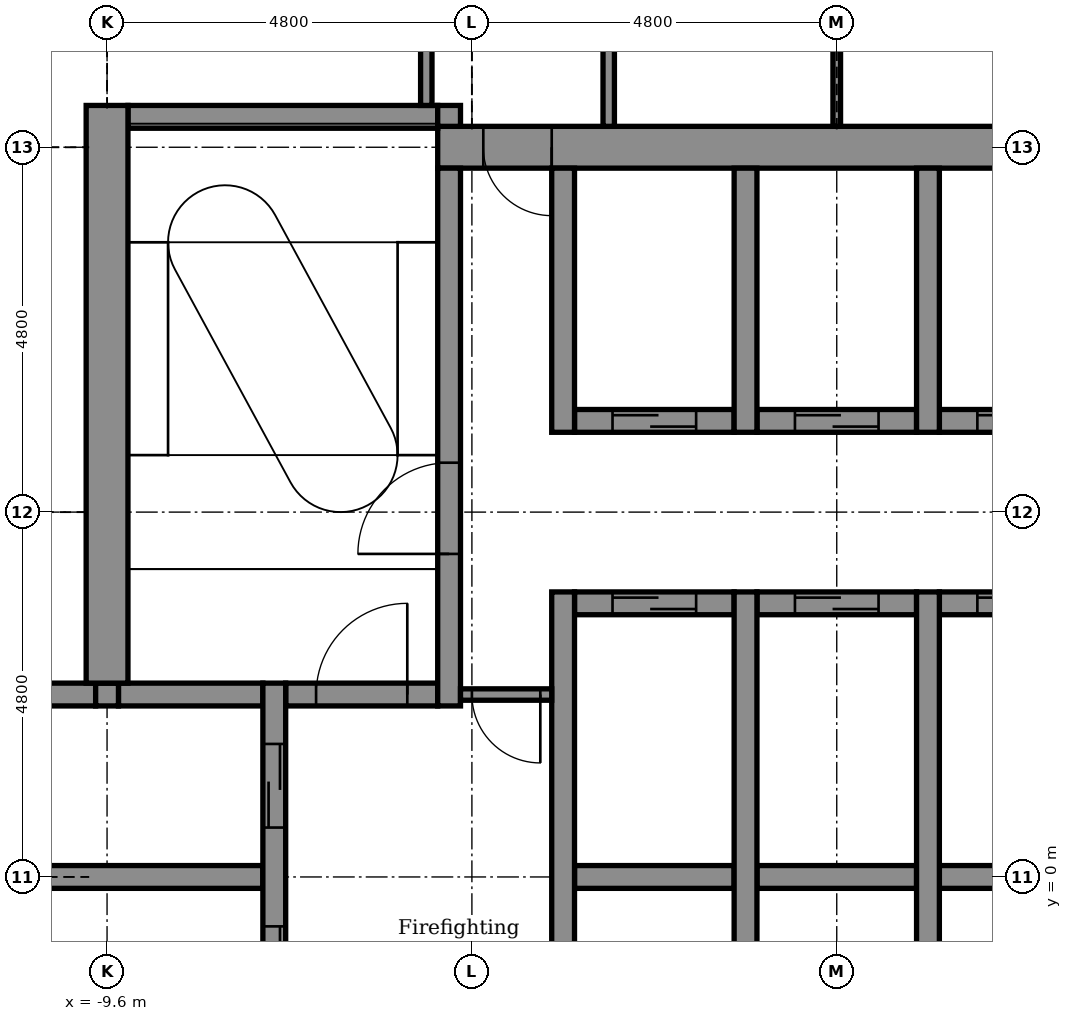
"""IFC4 building model, lengths in metres.
Left out: names, types, materials, properties, quantities, classifications, styles, units other than length and angle.
Written with IfcOpenShell. Run it as: python <this file> out.ifc"""

import sys

from ifc_helpers import new_model, si_unit, direction, frame, frame_2d, origin, place, context, subcontext, project, spatial, rectangle, extrude, element, fill, save


model = new_model("IFC4")
c1 = context("Model", 3, precision=1e-05, world=origin(), true_north=direction((0.0, 1.0)))
c2 = subcontext(c1, "Body", "Model", "MODEL_VIEW")
j1 = project(units=[si_unit("LENGTHUNIT", "METRE"), si_unit("PLANEANGLEUNIT", "RADIAN")], contexts=[c1])
p1 = place(None, origin())
s1 = spatial("IfcSite", under=j1, at=p1, CompositionType="ELEMENT")
p2 = place(p1, origin())
s2 = spatial("IfcBuilding", under=s1, at=p2, CompositionType="ELEMENT")
p3 = place(p2, frame((0.0, 0.0, 285.2)))
s3 = spatial("IfcBuildingStorey", under=s2, at=p3, CompositionType="ELEMENT", Elevation=285.2)
p4 = place(p3, frame((-10.85, 0.0, -0.15), z_axis=(0.0, 0.0, 1.0), x_axis=(1.0, 0.0, 0.0)))
e1 = element("IfcWall", 1, at=p4, inside=s3, PredefinedType="STANDARD", context=c2, shape_type="SweptSolid", body=[
    extrude(rectangle(XDim=3.3, YDim=0.3, at=frame_2d((1.65, 0.0))), origin(), (0.0, 0.0, 1.0), 3.9),
])
p5 = place(p3, frame((-3.45, 0.0, -0.15), z_axis=(0.0, 0.0, 1.0), x_axis=(1.0, 0.0, 0.0)))
e2 = element("IfcWall", 2, at=p5, inside=s3, PredefinedType="STANDARD", context=c2, shape_type="SweptSolid", body=[
    extrude(rectangle(XDim=2.1, YDim=0.3, at=frame_2d((1.05, 0.0))), origin(), (0.0, 0.0, 1.0), 3.9),
])
p6 = place(p3, frame((-1.05, 0.0, -0.15), z_axis=(0.0, 0.0, 1.0), x_axis=(1.0, 0.0, 0.0)))
e3 = element("IfcWall", 3, at=p6, inside=s3, PredefinedType="STANDARD", context=c2, shape_type="SweptSolid", body=[
    extrude(rectangle(XDim=2.1, YDim=0.3, at=frame_2d((1.05, 0.0))), origin(), (0.0, 0.0, 1.0), 3.9),
])
p7 = place(p3, frame((1.35, 0.0, -0.15), z_axis=(0.0, 0.0, 1.0), x_axis=(1.0, 0.0, 0.0)))
e4 = element("IfcWall", 4, at=p7, inside=s3, PredefinedType="STANDARD", context=c2, shape_type="SweptSolid", body=[
    extrude(rectangle(XDim=2.1, YDim=0.3, at=frame_2d((1.05, 0.0))), origin(), (0.0, 0.0, 1.0), 3.9),
])
p8 = place(p3, frame((-10.85, 2.4, -0.15), z_axis=(0.0, 0.0, 1.0), x_axis=(1.0, 0.0, 0.0)))
e5 = element("IfcWall", 5, at=p8, inside=s3, PredefinedType="STANDARD", context=c2, shape_type="SweptSolid", body=[
    extrude(rectangle(XDim=1.1, YDim=0.3, at=frame_2d((0.55, 0.0))), origin(), (0.0, 0.0, 1.0), 3.9),
])
p9 = place(p3, frame((-9.45, 2.4, -0.15), z_axis=(0.0, 0.0, 1.0), x_axis=(1.0, 0.0, 0.0)))
e6 = element("IfcWall", 6, at=p9, inside=s3, PredefinedType="STANDARD", context=c2, shape_type="SweptSolid", body=[
    extrude(rectangle(XDim=1.9, YDim=0.3, at=frame_2d((0.95, 0.0))), origin(), (0.0, 0.0, 1.0), 3.9),
])
p10 = place(p3, frame((-7.25, 2.4, -0.15), z_axis=(0.0, 0.0, 1.0), x_axis=(1.0, 0.0, 0.0)))
e7 = element("IfcWall", 7, at=p10, inside=s3, PredefinedType="STANDARD", context=c2, shape_type="SweptSolid", body=[
    extrude(rectangle(XDim=2.0, YDim=0.3, at=frame_2d((1.0, 0.0))), origin(), (0.0, 0.0, 1.0), 3.9),
])
p11 = place(p10, frame((0.4, 0.0, 0.15)))
e8 = element("IfcOpeningElement", 8, at=p11, cuts=e7, PredefinedType="OPENING", context=c2, shape_type="SweptSolid", body=[
    extrude(rectangle(XDim=1.2, YDim=2.1, at=frame_2d((0.6, 1.05))), frame((0.0, 0.16, 0.0), z_axis=(0.0, -1.0, 0.0), x_axis=(1.0, 0.0, 0.0)), (0.0, 0.0, 1.0), 0.32),
])
p12 = place(p3, frame((-3.45, 3.6, -0.15), z_axis=(0.0, 0.0, 1.0), x_axis=(1.0, 0.0, 0.0)))
e9 = element("IfcWall", 9, at=p12, inside=s3, PredefinedType="STANDARD", context=c2, shape_type="SweptSolid", body=[
    extrude(rectangle(XDim=2.1, YDim=0.3, at=frame_2d((1.05, 0.0))), origin(), (0.0, 0.0, 1.0), 3.9),
])
p13 = place(p12, frame((0.5, 0.0, 0.15)))
e10 = element("IfcOpeningElement", 10, at=p13, cuts=e9, PredefinedType="OPENING", context=c2, shape_type="SweptSolid", body=[
    extrude(rectangle(XDim=1.1, YDim=2.1, at=frame_2d((0.55, 1.05))), frame((0.0, 0.16, 0.0), z_axis=(0.0, -1.0, 0.0), x_axis=(1.0, 0.0, 0.0)), (0.0, 0.0, 1.0), 0.32),
])
p14 = place(p3, frame((-1.05, 3.6, -0.15), z_axis=(0.0, 0.0, 1.0), x_axis=(1.0, 0.0, 0.0)))
e11 = element("IfcWall", 11, at=p14, inside=s3, PredefinedType="STANDARD", context=c2, shape_type="SweptSolid", body=[
    extrude(rectangle(XDim=2.1, YDim=0.3, at=frame_2d((1.05, 0.0))), origin(), (0.0, 0.0, 1.0), 3.9),
])
p15 = place(p14, frame((0.5, 0.0, 0.15)))
e12 = element("IfcOpeningElement", 12, at=p15, cuts=e11, PredefinedType="OPENING", context=c2, shape_type="SweptSolid", body=[
    extrude(rectangle(XDim=1.1, YDim=2.1, at=frame_2d((0.55, 1.05))), frame((0.0, 0.16, 0.0), z_axis=(0.0, -1.0, 0.0), x_axis=(1.0, 0.0, 0.0)), (0.0, 0.0, 1.0), 0.32),
])
p16 = place(p3, frame((1.35, 3.6, -0.15), z_axis=(0.0, 0.0, 1.0), x_axis=(1.0, 0.0, 0.0)))
e13 = element("IfcWall", 13, at=p16, inside=s3, PredefinedType="STANDARD", context=c2, shape_type="SweptSolid", body=[
    extrude(rectangle(XDim=2.1, YDim=0.3, at=frame_2d((1.05, 0.0))), origin(), (0.0, 0.0, 1.0), 3.9),
])
p17 = place(p16, frame((0.5, 0.0, 0.15)))
e14 = element("IfcOpeningElement", 14, at=p17, cuts=e13, PredefinedType="OPENING", context=c2, shape_type="SweptSolid", body=[
    extrude(rectangle(XDim=1.1, YDim=2.1, at=frame_2d((0.55, 1.05))), frame((0.0, 0.16, 0.0), z_axis=(0.0, -1.0, 0.0), x_axis=(1.0, 0.0, 0.0)), (0.0, 0.0, 1.0), 0.32),
])
p18 = place(p3, frame((-3.45, 6.0, -0.15), z_axis=(0.0, 0.0, 1.0), x_axis=(1.0, 0.0, 0.0)))
e15 = element("IfcWall", 15, at=p18, inside=s3, PredefinedType="STANDARD", context=c2, shape_type="SweptSolid", body=[
    extrude(rectangle(XDim=2.1, YDim=0.3, at=frame_2d((1.05, 0.0))), origin(), (0.0, 0.0, 1.0), 3.9),
])
p19 = place(p18, frame((0.5, 0.0, 0.15)))
e16 = element("IfcOpeningElement", 16, at=p19, cuts=e15, PredefinedType="OPENING", context=c2, shape_type="SweptSolid", body=[
    extrude(rectangle(XDim=1.1, YDim=2.1, at=frame_2d((0.55, 1.05))), frame((0.0, 0.16, 0.0), z_axis=(0.0, -1.0, 0.0), x_axis=(1.0, 0.0, 0.0)), (0.0, 0.0, 1.0), 0.32),
])
p20 = place(p3, frame((-1.05, 6.0, -0.15), z_axis=(0.0, 0.0, 1.0), x_axis=(1.0, 0.0, 0.0)))
e17 = element("IfcWall", 17, at=p20, inside=s3, PredefinedType="STANDARD", context=c2, shape_type="SweptSolid", body=[
    extrude(rectangle(XDim=2.1, YDim=0.3, at=frame_2d((1.05, 0.0))), origin(), (0.0, 0.0, 1.0), 3.9),
])
p21 = place(p20, frame((0.5, 0.0, 0.15)))
e18 = element("IfcOpeningElement", 18, at=p21, cuts=e17, PredefinedType="OPENING", context=c2, shape_type="SweptSolid", body=[
    extrude(rectangle(XDim=1.1, YDim=2.1, at=frame_2d((0.55, 1.05))), frame((0.0, 0.16, 0.0), z_axis=(0.0, -1.0, 0.0), x_axis=(1.0, 0.0, 0.0)), (0.0, 0.0, 1.0), 0.32),
])
p22 = place(p3, frame((1.35, 6.0, -0.15), z_axis=(0.0, 0.0, 1.0), x_axis=(1.0, 0.0, 0.0)))
e19 = element("IfcWall", 19, at=p22, inside=s3, PredefinedType="STANDARD", context=c2, shape_type="SweptSolid", body=[
    extrude(rectangle(XDim=2.1, YDim=0.3, at=frame_2d((1.05, 0.0))), origin(), (0.0, 0.0, 1.0), 3.9),
])
p23 = place(p22, frame((0.5, 0.0, 0.15)))
e20 = element("IfcOpeningElement", 20, at=p23, cuts=e19, PredefinedType="OPENING", context=c2, shape_type="SweptSolid", body=[
    extrude(rectangle(XDim=1.1, YDim=2.1, at=frame_2d((0.55, 1.05))), frame((0.0, 0.16, 0.0), z_axis=(0.0, -1.0, 0.0), x_axis=(1.0, 0.0, 0.0)), (0.0, 0.0, 1.0), 0.32),
])
p24 = place(p3, frame((-5.25, 9.6, -0.15), z_axis=(0.0, 0.0, 1.0), x_axis=(1.0, 0.0, 0.0)))
e21 = element("IfcWall", 21, at=p24, inside=s3, PredefinedType="SHEAR", context=c2, shape_type="SweptSolid", body=[
    extrude(rectangle(XDim=14.575, YDim=0.55, at=frame_2d((7.288, 0.0))), origin(), (0.0, 0.0, 1.0), 3.9),
])
p25 = place(p24, frame((0.6, 0.0, 0.15)))
e22 = element("IfcOpeningElement", 22, at=p25, cuts=e21, PredefinedType="OPENING", context=c2, shape_type="SweptSolid", body=[
    extrude(rectangle(XDim=0.9, YDim=2.1, at=frame_2d((0.45, 1.05))), frame((0.0, 0.285, 0.0), z_axis=(0.0, -1.0, 0.0), x_axis=(1.0, 0.0, 0.0)), (0.0, 0.0, 1.0), 0.57),
])
p26 = place(p3, frame((-9.325, 10.0, -0.15), z_axis=(0.0, 0.0, 1.0), x_axis=(1.0, 0.0, 0.0)))
e23 = element("IfcWall", 23, at=p26, inside=s3, PredefinedType="STANDARD", context=c2, shape_type="SweptSolid", body=[
    extrude(rectangle(XDim=4.075, YDim=0.3, at=frame_2d((2.038, 0.0))), origin(), (0.0, 0.0, 1.0), 3.9),
])
p27 = place(p3, frame((-9.6, 2.25, -0.15), z_axis=(0.0, 0.0, 1.0), x_axis=(0.0, 1.0, 0.0)))
e24 = element("IfcWall", 24, at=p27, inside=s3, PredefinedType="STANDARD", context=c2, shape_type="SweptSolid", body=[
    extrude(rectangle(XDim=0.3, YDim=0.3, at=frame_2d((0.15, 0.0))), origin(), (0.0, 0.0, 1.0), 3.9),
])
p28 = place(p3, frame((-9.6, 2.55, -0.15), z_axis=(0.0, 0.0, 1.0), x_axis=(0.0, 1.0, 0.0)))
e25 = element("IfcWall", 25, at=p28, inside=s3, PredefinedType="SHEAR", context=c2, shape_type="SweptSolid", body=[
    extrude(rectangle(XDim=7.6, YDim=0.55, at=frame_2d((3.8, 0.0))), origin(), (0.0, 0.0, 1.0), 3.9),
])
p29 = place(p3, frame((-7.4, -2.55, -0.15), z_axis=(0.0, 0.0, 1.0), x_axis=(0.0, 1.0, 0.0)))
e26 = element("IfcWall", 26, at=p29, inside=s3, PredefinedType="STANDARD", context=c2, shape_type="SweptSolid", body=[
    extrude(rectangle(XDim=5.1, YDim=0.3, at=frame_2d((2.55, 0.0))), origin(), (0.0, 0.0, 1.0), 3.9),
])
p30 = place(p29, frame((0.8, 0.0, 0.15)))
e27 = element("IfcOpeningElement", 27, at=p30, cuts=e26, PredefinedType="OPENING", context=c2, shape_type="SweptSolid", body=[
    extrude(rectangle(XDim=1.1, YDim=2.1, at=frame_2d((0.55, 1.05))), frame((0.0, 0.16, 0.0), z_axis=(0.0, -1.0, 0.0), x_axis=(1.0, 0.0, 0.0)), (0.0, 0.0, 1.0), 0.32),
])
p31 = place(p29, frame((3.2, 0.0, 0.15)))
e28 = element("IfcOpeningElement", 28, at=p31, cuts=e26, PredefinedType="OPENING", context=c2, shape_type="SweptSolid", body=[
    extrude(rectangle(XDim=1.1, YDim=2.1, at=frame_2d((0.55, 1.05))), frame((0.0, 0.16, 0.0), z_axis=(0.0, -1.0, 0.0), x_axis=(1.0, 0.0, 0.0)), (0.0, 0.0, 1.0), 0.32),
])
p32 = place(p3, frame((-5.1, 2.25, -0.15), z_axis=(0.0, 0.0, 1.0), x_axis=(0.0, 1.0, 0.0)))
e29 = element("IfcWall", 29, at=p32, inside=s3, PredefinedType="STANDARD", context=c2, shape_type="SweptSolid", body=[
    extrude(rectangle(XDim=7.075, YDim=0.3, at=frame_2d((3.538, 0.0))), origin(), (0.0, 0.0, 1.0), 3.9),
])
p33 = place(p32, frame((2.0, 0.0, 0.15)))
e30 = element("IfcOpeningElement", 30, at=p33, cuts=e29, PredefinedType="OPENING", context=c2, shape_type="SweptSolid", body=[
    extrude(rectangle(XDim=1.2, YDim=2.1, at=frame_2d((0.6, 1.05))), frame((0.0, 0.16, 0.0), z_axis=(0.0, -1.0, 0.0), x_axis=(1.0, 0.0, 0.0)), (0.0, 0.0, 1.0), 0.32),
])
p34 = place(p3, frame((-5.1, 9.875, -0.15), z_axis=(0.0, 0.0, 1.0), x_axis=(0.0, 1.0, 0.0)))
e31 = element("IfcWall", 31, at=p34, inside=s3, PredefinedType="STANDARD", context=c2, shape_type="SweptSolid", body=[
    extrude(rectangle(XDim=0.275, YDim=0.3, at=frame_2d((0.137, 0.0))), origin(), (0.0, 0.0, 1.0), 3.9),
])
p35 = place(p3, frame((-3.6, -3.75, -0.15), z_axis=(0.0, 0.0, 1.0), x_axis=(0.0, 1.0, 0.0)))
e32 = element("IfcWall", 32, at=p35, inside=s3, PredefinedType="STANDARD", context=c2, shape_type="SweptSolid", body=[
    extrude(rectangle(XDim=7.5, YDim=0.3, at=frame_2d((3.75, 0.0))), origin(), (0.0, 0.0, 1.0), 3.9),
])
p36 = place(p3, frame((-3.6, 5.85, -0.15), z_axis=(0.0, 0.0, 1.0), x_axis=(0.0, 1.0, 0.0)))
e33 = element("IfcWall", 33, at=p36, inside=s3, PredefinedType="STANDARD", context=c2, shape_type="SweptSolid", body=[
    extrude(rectangle(XDim=3.475, YDim=0.3, at=frame_2d((1.737, 0.0))), origin(), (0.0, 0.0, 1.0), 3.9),
])
p37 = place(p3, frame((-1.2, -3.75, -0.15), z_axis=(0.0, 0.0, 1.0), x_axis=(0.0, 1.0, 0.0)))
e34 = element("IfcWall", 34, at=p37, inside=s3, PredefinedType="STANDARD", context=c2, shape_type="SweptSolid", body=[
    extrude(rectangle(XDim=7.5, YDim=0.3, at=frame_2d((3.75, 0.0))), origin(), (0.0, 0.0, 1.0), 3.9),
])
p38 = place(p3, frame((-1.2, 5.85, -0.15), z_axis=(0.0, 0.0, 1.0), x_axis=(0.0, 1.0, 0.0)))
e35 = element("IfcWall", 35, at=p38, inside=s3, PredefinedType="STANDARD", context=c2, shape_type="SweptSolid", body=[
    extrude(rectangle(XDim=3.475, YDim=0.3, at=frame_2d((1.737, 0.0))), origin(), (0.0, 0.0, 1.0), 3.9),
])
p39 = place(p3, frame((1.2, -3.75, -0.15), z_axis=(0.0, 0.0, 1.0), x_axis=(0.0, 1.0, 0.0)))
e36 = element("IfcWall", 36, at=p39, inside=s3, PredefinedType="STANDARD", context=c2, shape_type="SweptSolid", body=[
    extrude(rectangle(XDim=7.5, YDim=0.3, at=frame_2d((3.75, 0.0))), origin(), (0.0, 0.0, 1.0), 3.9),
])
p40 = place(p3, frame((1.2, 5.85, -0.15), z_axis=(0.0, 0.0, 1.0), x_axis=(0.0, 1.0, 0.0)))
e37 = element("IfcWall", 37, at=p40, inside=s3, PredefinedType="STANDARD", context=c2, shape_type="SweptSolid", body=[
    extrude(rectangle(XDim=3.475, YDim=0.3, at=frame_2d((1.737, 0.0))), origin(), (0.0, 0.0, 1.0), 3.9),
])
p41 = place(p3, frame((0.0, 9.875, 0.0), z_axis=(0.0, 0.0, 1.0), x_axis=(0.0, 1.0, 0.0)))
e38 = element("IfcWall", 38, at=p41, inside=s3, PredefinedType="PARTITIONING", context=c2, shape_type="SweptSolid", body=[
    extrude(rectangle(XDim=3.125, YDim=0.1, at=frame_2d((1.562, 0.0))), origin(), (0.0, 0.0, 1.0), 3.217),
])
p42 = place(p3, frame((-3.0, 9.875, 0.0), z_axis=(0.0, 0.0, 1.0), x_axis=(0.0, 1.0, 0.0)))
e39 = element("IfcWall", 39, at=p42, inside=s3, PredefinedType="PARTITIONING", context=c2, shape_type="SweptSolid", body=[
    extrude(rectangle(XDim=3.125, YDim=0.15, at=frame_2d((1.562, 0.0))), origin(), (0.0, 0.0, 1.0), 3.75),
])
p43 = place(p3, frame((-5.4, 10.15, 0.0), z_axis=(0.0, 0.0, 1.0), x_axis=(0.0, 1.0, 0.0)))
e40 = element("IfcWall", 40, at=p43, inside=s3, PredefinedType="PARTITIONING", context=c2, shape_type="SweptSolid", body=[
    extrude(rectangle(XDim=2.85, YDim=0.15, at=frame_2d((1.425, 0.0))), origin(), (0.0, 0.0, 1.0), 3.75),
])
p44 = place(p3, frame((-4.95, 2.4, 0.0), z_axis=(0.0, 0.0, 1.0), x_axis=(1.0, 0.0, 0.0)))
e41 = element("IfcWall", 41, at=p44, inside=s3, PredefinedType="PARTITIONING", context=c2, shape_type="SweptSolid", body=[
    extrude(rectangle(XDim=1.2, YDim=0.15, at=frame_2d((0.6, 0.0))), origin(), (0.0, 0.0, 1.0), 3.75),
])
p45 = place(p44, frame((0.15, 0.0, 0.0)))
e42 = element("IfcOpeningElement", 42, at=p45, cuts=e41, PredefinedType="OPENING", context=c2, shape_type="SweptSolid", body=[
    extrude(rectangle(XDim=0.9, YDim=2.1, at=frame_2d((0.45, 1.05))), frame((0.0, 0.085, 0.0), z_axis=(0.0, -1.0, 0.0), x_axis=(1.0, 0.0, 0.0)), (0.0, 0.0, 1.0), 0.17),
])
p46 = place(p30, origin())
e43 = element("IfcDoor", 43, at=p46, inside=s3, OperationType="DOUBLE_DOOR_SLIDING", PredefinedType="DOOR", context=c2, shape_type="SweptSolid", body=[
    extrude(rectangle(XDim=1.1, YDim=2.1, at=frame_2d((0.55, 1.05))), frame((0.0, 0.025, 0.0), z_axis=(0.0, -1.0, 0.0), x_axis=(1.0, 0.0, 0.0)), (0.0, 0.0, 1.0), 0.05),
])
fill(e27, e43)
p47 = place(p31, origin())
e44 = element("IfcDoor", 44, at=p47, inside=s3, OperationType="DOUBLE_DOOR_SLIDING", PredefinedType="DOOR", context=c2, shape_type="SweptSolid", body=[
    extrude(rectangle(XDim=1.1, YDim=2.1, at=frame_2d((0.55, 1.05))), frame((0.0, 0.025, 0.0), z_axis=(0.0, -1.0, 0.0), x_axis=(1.0, 0.0, 0.0)), (0.0, 0.0, 1.0), 0.05),
])
fill(e28, e44)
p48 = place(p19, origin())
e45 = element("IfcDoor", 45, at=p48, inside=s3, OperationType="DOUBLE_DOOR_SLIDING", PredefinedType="DOOR", context=c2, shape_type="SweptSolid", body=[
    extrude(rectangle(XDim=1.1, YDim=2.1, at=frame_2d((0.55, 1.05))), frame((0.0, 0.025, 0.0), z_axis=(0.0, -1.0, 0.0), x_axis=(1.0, 0.0, 0.0)), (0.0, 0.0, 1.0), 0.05),
])
fill(e16, e45)
p49 = place(p21, origin())
e46 = element("IfcDoor", 46, at=p49, inside=s3, OperationType="DOUBLE_DOOR_SLIDING", PredefinedType="DOOR", context=c2, shape_type="SweptSolid", body=[
    extrude(rectangle(XDim=1.1, YDim=2.1, at=frame_2d((0.55, 1.05))), frame((0.0, 0.025, 0.0), z_axis=(0.0, -1.0, 0.0), x_axis=(1.0, 0.0, 0.0)), (0.0, 0.0, 1.0), 0.05),
])
fill(e18, e46)
p50 = place(p23, origin())
e47 = element("IfcDoor", 47, at=p50, inside=s3, OperationType="DOUBLE_DOOR_SLIDING", PredefinedType="DOOR", context=c2, shape_type="SweptSolid", body=[
    extrude(rectangle(XDim=1.1, YDim=2.1, at=frame_2d((0.55, 1.05))), frame((0.0, 0.025, 0.0), z_axis=(0.0, -1.0, 0.0), x_axis=(1.0, 0.0, 0.0)), (0.0, 0.0, 1.0), 0.05),
])
fill(e20, e47)
p51 = place(p13, origin())
e48 = element("IfcDoor", 48, at=p51, inside=s3, OperationType="DOUBLE_DOOR_SLIDING", PredefinedType="DOOR", context=c2, shape_type="SweptSolid", body=[
    extrude(rectangle(XDim=1.1, YDim=2.1, at=frame_2d((0.55, 1.05))), frame((0.0, 0.025, 0.0), z_axis=(0.0, -1.0, 0.0), x_axis=(1.0, 0.0, 0.0)), (0.0, 0.0, 1.0), 0.05),
])
fill(e10, e48)
p52 = place(p15, origin())
e49 = element("IfcDoor", 49, at=p52, inside=s3, OperationType="DOUBLE_DOOR_SLIDING", PredefinedType="DOOR", context=c2, shape_type="SweptSolid", body=[
    extrude(rectangle(XDim=1.1, YDim=2.1, at=frame_2d((0.55, 1.05))), frame((0.0, 0.025, 0.0), z_axis=(0.0, -1.0, 0.0), x_axis=(1.0, 0.0, 0.0)), (0.0, 0.0, 1.0), 0.05),
])
fill(e12, e49)
p53 = place(p17, origin())
e50 = element("IfcDoor", 50, at=p53, inside=s3, OperationType="DOUBLE_DOOR_SLIDING", PredefinedType="DOOR", context=c2, shape_type="SweptSolid", body=[
    extrude(rectangle(XDim=1.1, YDim=2.1, at=frame_2d((0.55, 1.05))), frame((0.0, 0.025, 0.0), z_axis=(0.0, -1.0, 0.0), x_axis=(1.0, 0.0, 0.0)), (0.0, 0.0, 1.0), 0.05),
])
fill(e14, e50)
p54 = place(p33, origin())
e51 = element("IfcDoor", 51, at=p54, inside=s3, OperationType="SINGLE_SWING_LEFT", PredefinedType="DOOR", context=c2, shape_type="SweptSolid", body=[
    extrude(rectangle(XDim=1.2, YDim=2.1, at=frame_2d((0.6, 1.05))), frame((0.0, 0.025, 0.0), z_axis=(0.0, -1.0, 0.0), x_axis=(1.0, 0.0, 0.0)), (0.0, 0.0, 1.0), 0.05),
])
fill(e30, e51)
p55 = place(p25, frame((0.9, 0.0, 0.0), z_axis=(0.0, 0.0, 1.0), x_axis=(-1.0, 0.0, 0.0)))
e52 = element("IfcDoor", 52, at=p55, inside=s3, OperationType="SINGLE_SWING_RIGHT", PredefinedType="DOOR", context=c2, shape_type="SweptSolid", body=[
    extrude(rectangle(XDim=0.9, YDim=2.1, at=frame_2d((0.45, 1.05))), frame((0.0, 0.025, 0.0), z_axis=(0.0, -1.0, 0.0), x_axis=(1.0, 0.0, 0.0)), (0.0, 0.0, 1.0), 0.05),
])
fill(e22, e52)
p56 = place(p45, frame((0.9, 0.0, 0.0), z_axis=(0.0, 0.0, 1.0), x_axis=(-1.0, 0.0, 0.0)))
e53 = element("IfcDoor", 53, at=p56, inside=s3, OperationType="SINGLE_SWING_RIGHT", PredefinedType="DOOR", context=c2, shape_type="SweptSolid", body=[
    extrude(rectangle(XDim=0.9, YDim=2.1, at=frame_2d((0.45, 1.05))), frame((0.0, 0.025, 0.0), z_axis=(0.0, -1.0, 0.0), x_axis=(1.0, 0.0, 0.0)), (0.0, 0.0, 1.0), 0.05),
])
fill(e42, e53)
p57 = place(p11, origin())
e54 = element("IfcDoor", 54, at=p57, inside=s3, OperationType="SINGLE_SWING_RIGHT", PredefinedType="DOOR", context=c2, shape_type="SweptSolid", body=[
    extrude(rectangle(XDim=1.2, YDim=2.1, at=frame_2d((0.6, 1.05))), frame((0.0, 0.025, 0.0), z_axis=(0.0, -1.0, 0.0), x_axis=(1.0, 0.0, 0.0)), (0.0, 0.0, 1.0), 0.05),
])
fill(e8, e54)
save(model, sys.argv[1])
